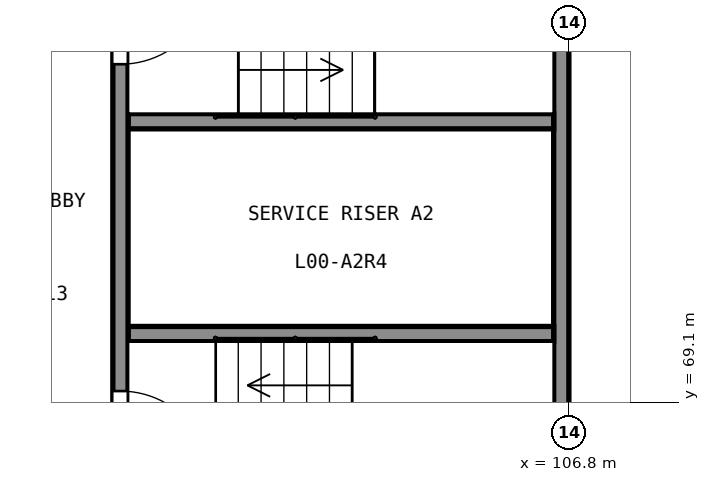
"""IFC4 building model, lengths in metres.
Left out: names, types, materials, properties, quantities, classifications, styles, units other than length and angle.
Written with IfcOpenShell. Run it as: python <this file> out.ifc"""

import sys

from ifc_helpers import new_model, si_unit, direction, frame, frame_2d, origin, place, context, subcontext, project, spatial, rectangle, extrude, element, fill, save


model = new_model("IFC4")
c1 = context("Model", 3, precision=1e-05, world=origin(), true_north=direction((0.0, 1.0)))
c2 = subcontext(c1, "Body", "Model", "MODEL_VIEW")
j1 = project(units=[si_unit("LENGTHUNIT", "METRE"), si_unit("PLANEANGLEUNIT", "RADIAN")], contexts=[c1])
p1 = place(None, origin())
s1 = spatial("IfcSite", under=j1, at=p1, CompositionType="ELEMENT")
p2 = place(p1, origin())
s2 = spatial("IfcBuilding", under=s1, at=p2, CompositionType="ELEMENT")
p3 = place(p2, origin())
s3 = spatial("IfcBuildingStorey", under=s2, at=p3, CompositionType="ELEMENT", Elevation=0.0)
p4 = place(p3, frame((106.7, 67.4, -1.8), z_axis=(0.0, 0.0, 1.0), x_axis=(0.0, 1.0, 0.0)))
e1 = element("IfcWall", 1, at=p4, inside=s3, PredefinedType="SHEAR", context=c2, shape_type="SweptSolid", body=[
    extrude(rectangle(XDim=8.0, YDim=0.2, at=frame_2d((4.0, 0.0))), origin(), (0.0, 0.0, 1.0), 7.3),
])
p5 = place(p3, frame((100.9, 67.4, -1.8), z_axis=(0.0, 0.0, 1.0), x_axis=(0.0, 1.0, 0.0)))
e2 = element("IfcWall", 2, at=p5, inside=s3, PredefinedType="SHEAR", context=c2, shape_type="SweptSolid", body=[
    extrude(rectangle(XDim=8.0, YDim=0.2, at=frame_2d((4.0, 0.0))), origin(), (0.0, 0.0, 1.0), 7.3),
])
p6 = place(p5, frame((0.65, 0.0, 1.8)))
e3 = element("IfcOpeningElement", 3, at=p6, cuts=e2, PredefinedType="OPENING", context=c2, shape_type="SweptSolid", body=[
    extrude(rectangle(XDim=1.2, YDim=2.1, at=frame_2d((0.6, 1.05))), frame((0.0, 0.11, 0.0), z_axis=(0.0, -1.0, 0.0), x_axis=(1.0, 0.0, 0.0)), (0.0, 0.0, 1.0), 0.22),
])
p7 = place(p5, frame((6.15, 0.0, 1.8)))
e4 = element("IfcOpeningElement", 4, at=p7, cuts=e2, PredefinedType="OPENING", context=c2, shape_type="SweptSolid", body=[
    extrude(rectangle(XDim=1.2, YDim=2.1, at=frame_2d((0.6, 1.05))), frame((0.0, 0.11, 0.0), z_axis=(0.0, -1.0, 0.0), x_axis=(1.0, 0.0, 0.0)), (0.0, 0.0, 1.0), 0.22),
])
for number, where, z_axis, x_axis in (
    (5, (101.0, 70.0, -1.8), (0.0, 0.0, 1.0), (1.0, 0.0, 0.0)),
    (6, (101.0, 72.8, -1.8), (0.0, 0.0, 1.0), (1.0, 0.0, 0.0)),
):
    element("IfcWall", number, at=place(p3, frame(where, z_axis=z_axis, x_axis=x_axis)), inside=s3, PredefinedType="SHEAR", context=c2, shape_type="SweptSolid", body=[
        extrude(rectangle(XDim=5.6, YDim=0.2, at=frame_2d((2.8, 0.0))), origin(), (0.0, 0.0, 1.0), 7.3),
    ])
p8 = place(p6, origin())
e7 = element("IfcDoor", 7, at=p8, inside=s3, OperationType="SINGLE_SWING_LEFT", PredefinedType="DOOR", context=c2, shape_type="SweptSolid", body=[
    extrude(rectangle(XDim=1.2, YDim=2.1, at=frame_2d((0.6, 1.05))), frame((0.0, 0.025, 0.0), z_axis=(0.0, -1.0, 0.0), x_axis=(1.0, 0.0, 0.0)), (0.0, 0.0, 1.0), 0.05),
])
fill(e3, e7)
p9 = place(p7, origin())
e8 = element("IfcDoor", 8, at=p9, inside=s3, OperationType="SINGLE_SWING_RIGHT", PredefinedType="DOOR", context=c2, shape_type="SweptSolid", body=[
    extrude(rectangle(XDim=1.2, YDim=2.1, at=frame_2d((0.6, 1.05))), frame((0.0, 0.025, 0.0), z_axis=(0.0, -1.0, 0.0), x_axis=(1.0, 0.0, 0.0)), (0.0, 0.0, 1.0), 0.05),
])
fill(e4, e8)
save(model, sys.argv[1])
